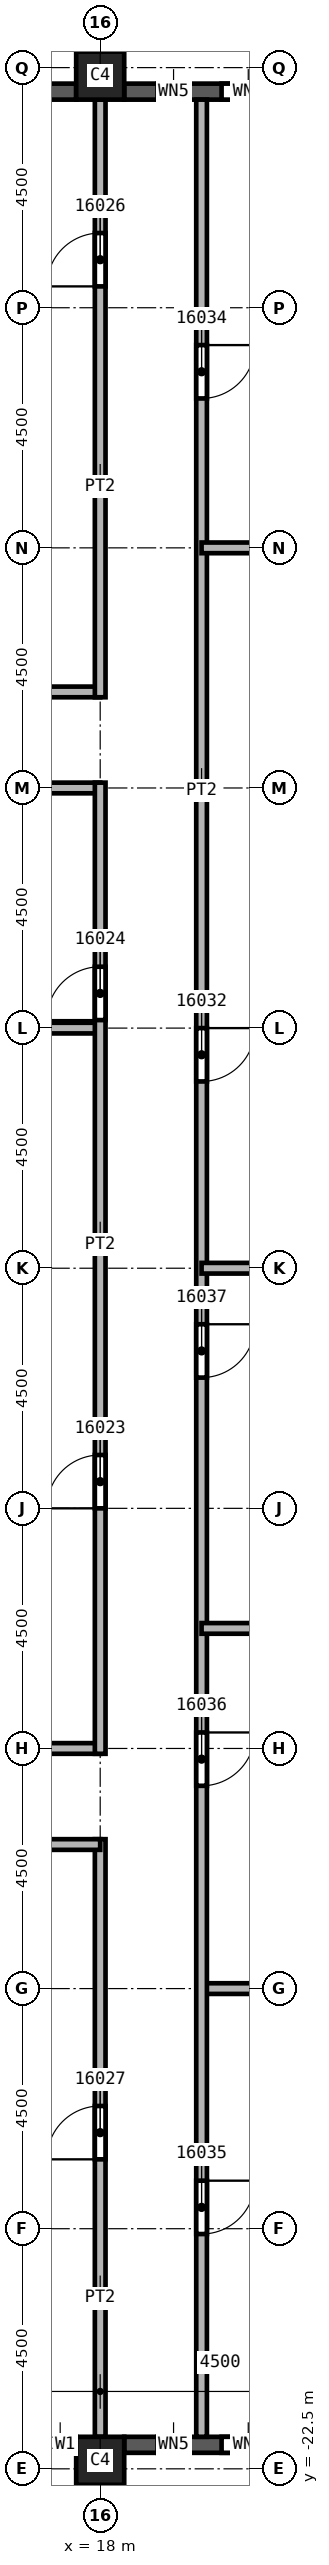
"""IFC4 building model, lengths in metres.
Left out: names, types, materials, properties, quantities, classifications, styles, units other than length and angle.
Written with IfcOpenShell. Run it as: python <this file> out.ifc"""

import sys

from ifc_helpers import new_model, si_unit, direction, frame, frame_2d, origin, origin_2d, place, context, subcontext, project, spatial, rectangle, extrude, element, fill, save


model = new_model("IFC4")
c1 = context("Model", 3, precision=1e-05, world=origin(), true_north=direction((0.0, 1.0)))
c2 = subcontext(c1, "Body", "Model", "MODEL_VIEW")
j1 = project(units=[si_unit("LENGTHUNIT", "METRE"), si_unit("PLANEANGLEUNIT", "RADIAN")], contexts=[c1])
p1 = place(None, origin())
s1 = spatial("IfcSite", under=j1, at=p1, CompositionType="ELEMENT")
p2 = place(p1, origin())
s2 = spatial("IfcBuilding", under=s1, at=p2, CompositionType="ELEMENT")
p3 = place(p2, frame((0.0, 0.0, 242.0)))
s3 = spatial("IfcBuildingStorey", under=s2, at=p3, CompositionType="ELEMENT", Elevation=242.0)
for number, where, z_axis, x_axis in (
    (1, (18.0, 22.35, 0.0), (0.0, 0.0, 1.0), (1.0, 0.0, 0.0)),
    (2, (18.0, -22.35, 0.0), (0.0, 0.0, 1.0), (1.0, 0.0, 0.0)),
):
    element("IfcColumn", number, at=place(p3, frame(where, z_axis=z_axis, x_axis=x_axis)), inside=s3, PredefinedType="COLUMN", context=c2, shape_type="SweptSolid", body=[
        extrude(rectangle(XDim=0.9, YDim=0.9, at=origin_2d()), origin(), (0.0, 0.0, 1.0), 3.72),
    ])
p4 = place(p3, frame((13.95, -22.05, 0.0), z_axis=(0.0, 0.0, 1.0), x_axis=(1.0, 0.0, 0.0)))
e3 = element("IfcWall", 3, at=p4, inside=s3, PredefinedType="SOLIDWALL", context=c2, shape_type="SweptSolid", body=[
    extrude(rectangle(XDim=3.6, YDim=0.3, at=frame_2d((1.8, 0.0))), origin(), (0.0, 0.0, 1.0), 3.12),
])
p5 = place(p4, frame((0.6, 0.0, 0.8)))
e4 = element("IfcOpeningElement", 4, at=p5, cuts=e3, PredefinedType="OPENING", context=c2, shape_type="SweptSolid", body=[
    extrude(rectangle(XDim=2.4, YDim=1.95, at=frame_2d((1.2, 0.975))), frame((0.0, 0.15, 0.0), z_axis=(0.0, -1.0, 0.0), x_axis=(1.0, 0.0, 0.0)), (0.0, 0.0, 1.0), 0.3),
])
p6 = place(p3, frame((18.45, -22.05, 0.0), z_axis=(0.0, 0.0, 1.0), x_axis=(1.0, 0.0, 0.0)))
e5 = element("IfcWall", 5, at=p6, inside=s3, PredefinedType="SOLIDWALL", context=c2, shape_type="SweptSolid", body=[
    extrude(rectangle(XDim=3.6, YDim=0.3, at=frame_2d((1.8, 0.0))), origin(), (0.0, 0.0, 1.0), 3.12),
])
p7 = place(p6, frame((0.625, 0.0, 0.8)))
e6 = element("IfcOpeningElement", 6, at=p7, cuts=e5, PredefinedType="OPENING", context=c2, shape_type="SweptSolid", body=[
    extrude(rectangle(XDim=0.6, YDim=1.95, at=frame_2d((0.3, 0.975))), frame((0.0, 0.15, 0.0), z_axis=(0.0, -1.0, 0.0), x_axis=(1.0, 0.0, 0.0)), (0.0, 0.0, 1.0), 0.3),
])
p8 = place(p6, frame((1.825, 0.0, 0.8)))
e7 = element("IfcOpeningElement", 7, at=p8, cuts=e5, PredefinedType="OPENING", context=c2, shape_type="SweptSolid", body=[
    extrude(rectangle(XDim=1.0, YDim=1.95, at=frame_2d((0.5, 0.975))), frame((0.0, 0.15, 0.0), z_axis=(0.0, -1.0, 0.0), x_axis=(1.0, 0.0, 0.0)), (0.0, 0.0, 1.0), 0.3),
])
p9 = place(p3, frame((22.05, 22.05, 0.0), z_axis=(0.0, 0.0, 1.0), x_axis=(-1.0, 0.0, 0.0)))
e8 = element("IfcWall", 8, at=p9, inside=s3, PredefinedType="SOLIDWALL", context=c2, shape_type="SweptSolid", body=[
    extrude(rectangle(XDim=3.6, YDim=0.3, at=frame_2d((1.8, 0.0))), origin(), (0.0, 0.0, 1.0), 3.12),
])
p10 = place(p9, frame((0.775, 0.0, 0.8)))
e9 = element("IfcOpeningElement", 9, at=p10, cuts=e8, PredefinedType="OPENING", context=c2, shape_type="SweptSolid", body=[
    extrude(rectangle(XDim=1.0, YDim=1.95, at=frame_2d((0.5, 0.975))), frame((0.0, 0.15, 0.0), z_axis=(0.0, -1.0, 0.0), x_axis=(1.0, 0.0, 0.0)), (0.0, 0.0, 1.0), 0.3),
])
p11 = place(p9, frame((2.375, 0.0, 0.8)))
e10 = element("IfcOpeningElement", 10, at=p11, cuts=e8, PredefinedType="OPENING", context=c2, shape_type="SweptSolid", body=[
    extrude(rectangle(XDim=0.6, YDim=1.95, at=frame_2d((0.3, 0.975))), frame((0.0, 0.15, 0.0), z_axis=(0.0, -1.0, 0.0), x_axis=(1.0, 0.0, 0.0)), (0.0, 0.0, 1.0), 0.3),
])
p12 = place(p3, frame((17.55, 22.05, 0.0), z_axis=(0.0, 0.0, 1.0), x_axis=(-1.0, 0.0, 0.0)))
e11 = element("IfcWall", 11, at=p12, inside=s3, PredefinedType="SOLIDWALL", context=c2, shape_type="SweptSolid", body=[
    extrude(rectangle(XDim=3.6, YDim=0.3, at=frame_2d((1.8, 0.0))), origin(), (0.0, 0.0, 1.0), 3.12),
])
p13 = place(p12, frame((0.6, 0.0, 0.8)))
e12 = element("IfcOpeningElement", 12, at=p13, cuts=e11, PredefinedType="OPENING", context=c2, shape_type="SweptSolid", body=[
    extrude(rectangle(XDim=2.4, YDim=1.95, at=frame_2d((1.2, 0.975))), frame((0.0, 0.15, 0.0), z_axis=(0.0, -1.0, 0.0), x_axis=(1.0, 0.0, 0.0)), (0.0, 0.0, 1.0), 0.3),
])
for number, where, z_axis, x_axis in (
    (13, (13.5, -9.0, 0.0), (0.0, 0.0, 1.0), (1.0, 0.0, 0.0)),
    (14, (13.5, 4.5, 0.0), (0.0, 0.0, 1.0), (1.0, 0.0, 0.0)),
    (15, (18.0, 9.0, 0.0), (0.0, 0.0, 1.0), (-1.0, 0.0, 0.0)),
):
    element("IfcWall", number, at=place(p3, frame(where, z_axis=z_axis, x_axis=x_axis)), inside=s3, PredefinedType="PARTITIONING", context=c2, shape_type="SweptSolid", body=[
        extrude(rectangle(XDim=4.5, YDim=0.2, at=frame_2d((2.25, 0.0))), origin(), (0.0, 0.0, 1.0), 3.72),
    ])
p14 = place(p3, frame((14.4, 10.8, 0.0), z_axis=(0.0, 0.0, 1.0), x_axis=(1.0, 0.0, 0.0)))
e16 = element("IfcWall", 16, at=p14, inside=s3, PredefinedType="PARTITIONING", context=c2, shape_type="SweptSolid", body=[
    extrude(rectangle(XDim=3.6, YDim=0.2, at=frame_2d((1.8, 0.0))), origin(), (0.0, 0.0, 1.0), 3.72),
])
p15 = place(p3, frame((18.0, -21.9, 0.0), z_axis=(0.0, 0.0, 1.0), x_axis=(0.0, 1.0, 0.0)))
e17 = element("IfcWall", 17, at=p15, inside=s3, PredefinedType="PARTITIONING", context=c2, shape_type="SweptSolid", body=[
    extrude(rectangle(XDim=11.2, YDim=0.2, at=frame_2d((5.6, 0.0))), origin(), (0.0, 0.0, 1.0), 3.72),
])
p16 = place(p15, frame((5.2, 0.0, 0.0)))
e18 = element("IfcOpeningElement", 18, at=p16, cuts=e17, PredefinedType="OPENING", context=c2, shape_type="SweptSolid", body=[
    extrude(rectangle(XDim=1.0, YDim=2.1, at=frame_2d((0.5, 1.05))), frame((0.0, 0.1, 0.0), z_axis=(0.0, -1.0, 0.0), x_axis=(1.0, 0.0, 0.0)), (0.0, 0.0, 1.0), 0.2),
])
p17 = place(p3, frame((18.0, -10.8, 0.0), z_axis=(0.0, 0.0, 1.0), x_axis=(-1.0, 0.0, 0.0)))
e19 = element("IfcWall", 19, at=p17, inside=s3, PredefinedType="PARTITIONING", context=c2, shape_type="SweptSolid", body=[
    extrude(rectangle(XDim=3.6, YDim=0.2, at=frame_2d((1.8, 0.0))), origin(), (0.0, 0.0, 1.0), 3.72),
])
p18 = place(p3, frame((18.0, -9.1, 0.0), z_axis=(0.0, 0.0, 1.0), x_axis=(0.0, 1.0, 0.0)))
e20 = element("IfcWall", 20, at=p18, inside=s3, PredefinedType="PARTITIONING", context=c2, shape_type="SweptSolid", body=[
    extrude(rectangle(XDim=18.2, YDim=0.2, at=frame_2d((9.1, 0.0))), origin(), (0.0, 0.0, 1.0), 3.72),
])
p19 = place(p18, frame((4.6, 0.0, 0.0)))
e21 = element("IfcOpeningElement", 21, at=p19, cuts=e20, PredefinedType="OPENING", context=c2, shape_type="SweptSolid", body=[
    extrude(rectangle(XDim=1.0, YDim=2.1, at=frame_2d((0.5, 1.05))), frame((0.0, 0.1, 0.0), z_axis=(0.0, -1.0, 0.0), x_axis=(1.0, 0.0, 0.0)), (0.0, 0.0, 1.0), 0.2),
])
p20 = place(p18, frame((13.75, 0.0, 0.0)))
e22 = element("IfcOpeningElement", 22, at=p20, cuts=e20, PredefinedType="OPENING", context=c2, shape_type="SweptSolid", body=[
    extrude(rectangle(XDim=1.0, YDim=2.1, at=frame_2d((0.5, 1.05))), frame((0.0, 0.1, 0.0), z_axis=(0.0, -1.0, 0.0), x_axis=(1.0, 0.0, 0.0)), (0.0, 0.0, 1.0), 0.2),
])
p21 = place(p3, frame((18.0, 10.7, 0.0), z_axis=(0.0, 0.0, 1.0), x_axis=(0.0, 1.0, 0.0)))
e23 = element("IfcWall", 23, at=p21, inside=s3, PredefinedType="PARTITIONING", context=c2, shape_type="SweptSolid", body=[
    extrude(rectangle(XDim=11.2, YDim=0.2, at=frame_2d((5.6, 0.0))), origin(), (0.0, 0.0, 1.0), 3.72),
])
p22 = place(p21, frame((7.7, 0.0, 0.0)))
e24 = element("IfcOpeningElement", 24, at=p22, cuts=e23, PredefinedType="OPENING", context=c2, shape_type="SweptSolid", body=[
    extrude(rectangle(XDim=1.0, YDim=2.1, at=frame_2d((0.5, 1.05))), frame((0.0, 0.1, 0.0), z_axis=(0.0, -1.0, 0.0), x_axis=(1.0, 0.0, 0.0)), (0.0, 0.0, 1.0), 0.2),
])
p23 = place(p3, frame((19.9, -13.5, 0.0), z_axis=(0.0, 0.0, 1.0), x_axis=(1.0, 0.0, 0.0)))
e25 = element("IfcWall", 25, at=p23, inside=s3, PredefinedType="PARTITIONING", context=c2, shape_type="SweptSolid", body=[
    extrude(rectangle(XDim=6.65, YDim=0.2, at=frame_2d((3.325, 0.0))), origin(), (0.0, 0.0, 1.0), 3.72),
])
p24 = place(p3, frame((19.9, 21.9, 0.0), z_axis=(0.0, 0.0, 1.0), x_axis=(0.0, -1.0, 0.0)))
e26 = element("IfcWall", 26, at=p24, inside=s3, PredefinedType="PARTITIONING", context=c2, shape_type="SweptSolid", body=[
    extrude(rectangle(XDim=43.8, YDim=0.2, at=frame_2d((21.9, 0.0))), origin(), (0.0, 0.0, 1.0), 3.72),
])
p25 = place(p24, frame((17.4, 0.0, 0.0)))
e27 = element("IfcOpeningElement", 27, at=p25, cuts=e26, PredefinedType="OPENING", context=c2, shape_type="SweptSolid", body=[
    extrude(rectangle(XDim=1.0, YDim=2.1, at=frame_2d((0.5, 1.05))), frame((0.0, 0.1, 0.0), z_axis=(0.0, -1.0, 0.0), x_axis=(1.0, 0.0, 0.0)), (0.0, 0.0, 1.0), 0.2),
])
p26 = place(p24, frame((4.6, 0.0, 0.0)))
e28 = element("IfcOpeningElement", 28, at=p26, cuts=e26, PredefinedType="OPENING", context=c2, shape_type="SweptSolid", body=[
    extrude(rectangle(XDim=1.0, YDim=2.1, at=frame_2d((0.5, 1.05))), frame((0.0, 0.1, 0.0), z_axis=(0.0, -1.0, 0.0), x_axis=(1.0, 0.0, 0.0)), (0.0, 0.0, 1.0), 0.2),
])
p27 = place(p24, frame((39.0, 0.0, 0.0)))
e29 = element("IfcOpeningElement", 29, at=p27, cuts=e26, PredefinedType="OPENING", context=c2, shape_type="SweptSolid", body=[
    extrude(rectangle(XDim=1.0, YDim=2.1, at=frame_2d((0.5, 1.05))), frame((0.0, 0.1, 0.0), z_axis=(0.0, -1.0, 0.0), x_axis=(1.0, 0.0, 0.0)), (0.0, 0.0, 1.0), 0.2),
])
p28 = place(p24, frame((30.6, 0.0, 0.0)))
e30 = element("IfcOpeningElement", 30, at=p28, cuts=e26, PredefinedType="OPENING", context=c2, shape_type="SweptSolid", body=[
    extrude(rectangle(XDim=1.0, YDim=2.1, at=frame_2d((0.5, 1.05))), frame((0.0, 0.1, 0.0), z_axis=(0.0, -1.0, 0.0), x_axis=(1.0, 0.0, 0.0)), (0.0, 0.0, 1.0), 0.2),
])
p29 = place(p24, frame((22.95, 0.0, 0.0)))
e31 = element("IfcOpeningElement", 31, at=p29, cuts=e26, PredefinedType="OPENING", context=c2, shape_type="SweptSolid", body=[
    extrude(rectangle(XDim=1.0, YDim=2.1, at=frame_2d((0.5, 1.05))), frame((0.0, 0.1, 0.0), z_axis=(0.0, -1.0, 0.0), x_axis=(1.0, 0.0, 0.0)), (0.0, 0.0, 1.0), 0.2),
])
for number, where, z_axis, x_axis in (
    (32, (19.9, -6.75, 0.0), (0.0, 0.0, 1.0), (1.0, 0.0, 0.0)),
    (33, (19.9, 13.5, 0.0), (0.0, 0.0, 1.0), (1.0, 0.0, 0.0)),
    (34, (26.55, 0.0, 0.0), (0.0, 0.0, 1.0), (-1.0, 0.0, 0.0)),
):
    element("IfcWall", number, at=place(p3, frame(where, z_axis=z_axis, x_axis=x_axis)), inside=s3, PredefinedType="PARTITIONING", context=c2, shape_type="SweptSolid", body=[
        extrude(rectangle(XDim=6.65, YDim=0.2, at=frame_2d((3.325, 0.0))), origin(), (0.0, 0.0, 1.0), 3.72),
    ])
p30 = place(p19, origin())
e35 = element("IfcDoor", 35, at=p30, inside=s3, OperationType="SINGLE_SWING_RIGHT", PredefinedType="DOOR", context=c2, shape_type="SweptSolid", body=[
    extrude(rectangle(XDim=1.0, YDim=2.1, at=frame_2d((0.5, 1.05))), frame((0.0, 0.025, 0.0), z_axis=(0.0, -1.0, 0.0), x_axis=(1.0, 0.0, 0.0)), (0.0, 0.0, 1.0), 0.05),
])
fill(e21, e35)
p31 = place(p20, origin())
e36 = element("IfcDoor", 36, at=p31, inside=s3, OperationType="SINGLE_SWING_LEFT", PredefinedType="DOOR", context=c2, shape_type="SweptSolid", body=[
    extrude(rectangle(XDim=1.0, YDim=2.1, at=frame_2d((0.5, 1.05))), frame((0.0, 0.025, 0.0), z_axis=(0.0, -1.0, 0.0), x_axis=(1.0, 0.0, 0.0)), (0.0, 0.0, 1.0), 0.05),
])
fill(e22, e36)
p32 = place(p22, origin())
e37 = element("IfcDoor", 37, at=p32, inside=s3, OperationType="SINGLE_SWING_LEFT", PredefinedType="DOOR", context=c2, shape_type="SweptSolid", body=[
    extrude(rectangle(XDim=1.0, YDim=2.1, at=frame_2d((0.5, 1.05))), frame((0.0, 0.025, 0.0), z_axis=(0.0, -1.0, 0.0), x_axis=(1.0, 0.0, 0.0)), (0.0, 0.0, 1.0), 0.05),
])
fill(e24, e37)
p33 = place(p16, origin())
e38 = element("IfcDoor", 38, at=p33, inside=s3, OperationType="SINGLE_SWING_RIGHT", PredefinedType="DOOR", context=c2, shape_type="SweptSolid", body=[
    extrude(rectangle(XDim=1.0, YDim=2.1, at=frame_2d((0.5, 1.05))), frame((0.0, 0.025, 0.0), z_axis=(0.0, -1.0, 0.0), x_axis=(1.0, 0.0, 0.0)), (0.0, 0.0, 1.0), 0.05),
])
fill(e18, e38)
p34 = place(p25, origin())
e39 = element("IfcDoor", 39, at=p34, inside=s3, OperationType="SINGLE_SWING_LEFT", PredefinedType="DOOR", context=c2, shape_type="SweptSolid", body=[
    extrude(rectangle(XDim=1.0, YDim=2.1, at=frame_2d((0.5, 1.05))), frame((0.0, 0.025, 0.0), z_axis=(0.0, -1.0, 0.0), x_axis=(1.0, 0.0, 0.0)), (0.0, 0.0, 1.0), 0.05),
])
fill(e27, e39)
p35 = place(p26, origin())
e40 = element("IfcDoor", 40, at=p35, inside=s3, OperationType="SINGLE_SWING_LEFT", PredefinedType="DOOR", context=c2, shape_type="SweptSolid", body=[
    extrude(rectangle(XDim=1.0, YDim=2.1, at=frame_2d((0.5, 1.05))), frame((0.0, 0.025, 0.0), z_axis=(0.0, -1.0, 0.0), x_axis=(1.0, 0.0, 0.0)), (0.0, 0.0, 1.0), 0.05),
])
fill(e28, e40)
p36 = place(p27, origin())
e41 = element("IfcDoor", 41, at=p36, inside=s3, OperationType="SINGLE_SWING_RIGHT", PredefinedType="DOOR", context=c2, shape_type="SweptSolid", body=[
    extrude(rectangle(XDim=1.0, YDim=2.1, at=frame_2d((0.5, 1.05))), frame((0.0, 0.025, 0.0), z_axis=(0.0, -1.0, 0.0), x_axis=(1.0, 0.0, 0.0)), (0.0, 0.0, 1.0), 0.05),
])
fill(e29, e41)
p37 = place(p28, origin())
e42 = element("IfcDoor", 42, at=p37, inside=s3, OperationType="SINGLE_SWING_LEFT", PredefinedType="DOOR", context=c2, shape_type="SweptSolid", body=[
    extrude(rectangle(XDim=1.0, YDim=2.1, at=frame_2d((0.5, 1.05))), frame((0.0, 0.025, 0.0), z_axis=(0.0, -1.0, 0.0), x_axis=(1.0, 0.0, 0.0)), (0.0, 0.0, 1.0), 0.05),
])
fill(e30, e42)
p38 = place(p29, origin())
e43 = element("IfcDoor", 43, at=p38, inside=s3, OperationType="SINGLE_SWING_RIGHT", PredefinedType="DOOR", context=c2, shape_type="SweptSolid", body=[
    extrude(rectangle(XDim=1.0, YDim=2.1, at=frame_2d((0.5, 1.05))), frame((0.0, 0.025, 0.0), z_axis=(0.0, -1.0, 0.0), x_axis=(1.0, 0.0, 0.0)), (0.0, 0.0, 1.0), 0.05),
])
fill(e31, e43)
p39 = place(p7, origin())
e44 = element("IfcWindow", 44, at=p39, inside=s3, PartitioningType="SINGLE_PANEL", PredefinedType="WINDOW", context=c2, shape_type="SweptSolid", body=[
    extrude(rectangle(XDim=0.6, YDim=1.95, at=frame_2d((0.3, 0.975))), frame((0.0, 0.03, 0.0), z_axis=(0.0, -1.0, 0.0), x_axis=(1.0, 0.0, 0.0)), (0.0, 0.0, 1.0), 0.06),
])
fill(e6, e44)
p40 = place(p8, origin())
e45 = element("IfcWindow", 45, at=p40, inside=s3, PartitioningType="SINGLE_PANEL", PredefinedType="WINDOW", context=c2, shape_type="SweptSolid", body=[
    extrude(rectangle(XDim=1.0, YDim=1.95, at=frame_2d((0.5, 0.975))), frame((0.0, 0.03, 0.0), z_axis=(0.0, -1.0, 0.0), x_axis=(1.0, 0.0, 0.0)), (0.0, 0.0, 1.0), 0.06),
])
fill(e7, e45)
p41 = place(p10, origin())
e46 = element("IfcWindow", 46, at=p41, inside=s3, PartitioningType="SINGLE_PANEL", PredefinedType="WINDOW", context=c2, shape_type="SweptSolid", body=[
    extrude(rectangle(XDim=1.0, YDim=1.95, at=frame_2d((0.5, 0.975))), frame((0.0, 0.03, 0.0), z_axis=(0.0, -1.0, 0.0), x_axis=(1.0, 0.0, 0.0)), (0.0, 0.0, 1.0), 0.06),
])
fill(e9, e46)
p42 = place(p11, origin())
e47 = element("IfcWindow", 47, at=p42, inside=s3, PartitioningType="SINGLE_PANEL", PredefinedType="WINDOW", context=c2, shape_type="SweptSolid", body=[
    extrude(rectangle(XDim=0.6, YDim=1.95, at=frame_2d((0.3, 0.975))), frame((0.0, 0.03, 0.0), z_axis=(0.0, -1.0, 0.0), x_axis=(1.0, 0.0, 0.0)), (0.0, 0.0, 1.0), 0.06),
])
fill(e10, e47)
save(model, sys.argv[1])
